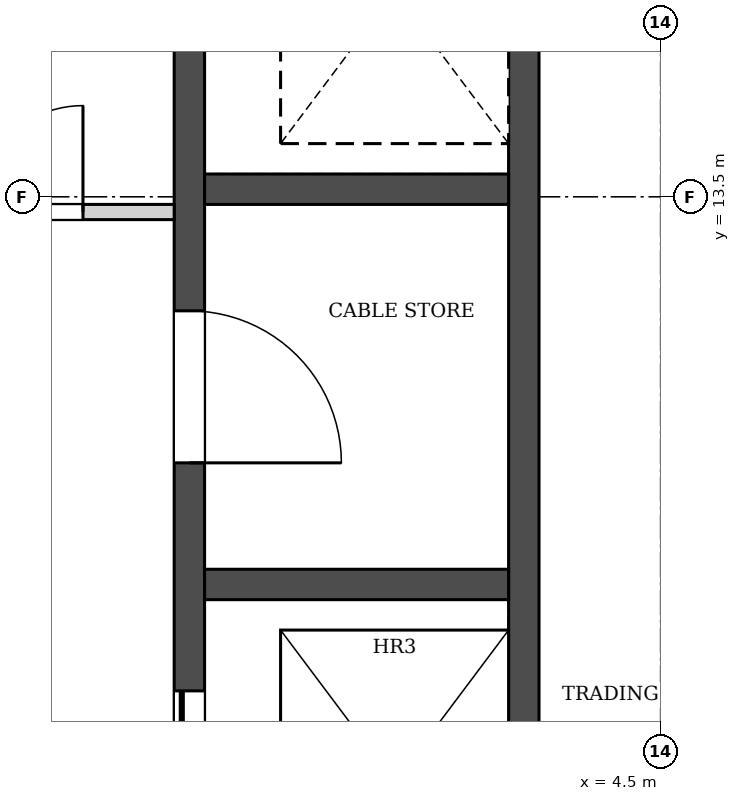
"""IFC4 building model, lengths in metres.
Left out: names, types, materials, properties, quantities, classifications, styles, units other than length and angle.
Written with IfcOpenShell. Run it as: python <this file> out.ifc"""

import sys

from ifc_helpers import new_model, si_unit, direction, frame, frame_2d, origin, place, context, subcontext, project, spatial, rectangle, extrude, element, fill, save


model = new_model("IFC4")
c1 = context("Model", 3, precision=1e-05, world=origin(), true_north=direction((0.0, 1.0)))
c2 = subcontext(c1, "Body", "Model", "MODEL_VIEW")
j1 = project(units=[si_unit("LENGTHUNIT", "METRE"), si_unit("PLANEANGLEUNIT", "RADIAN")], contexts=[c1])
p1 = place(None, origin())
s1 = spatial("IfcSite", under=j1, at=p1, CompositionType="ELEMENT")
p2 = place(p1, origin())
s2 = spatial("IfcBuilding", under=s1, at=p2, CompositionType="ELEMENT")
p3 = place(p2, frame((0.0, 0.0, 335.1)))
s3 = spatial("IfcBuildingStorey", under=s2, at=p3, CompositionType="ELEMENT", Elevation=335.1)
p4 = place(p3, frame((23.788, 7.709, 0.0), z_axis=(0.0, 0.0, 1.0), x_axis=(-0.500001731347, 0.866024404189, 0.0)))
e1 = element("IfcWall", 1, at=p4, inside=s3, PredefinedType="SOLIDWALL", context=c2, shape_type="SweptSolid", body=[
    extrude(rectangle(XDim=38.87, YDim=0.34, at=frame_2d((19.435, 0.0))), origin(), (0.0, 0.0, 1.0), 3.8),
])
p5 = place(p4, frame((3.218, 0.0, 0.9)))
e2 = element("IfcOpeningElement", 2, at=p5, cuts=e1, PredefinedType="OPENING", context=c2, shape_type="SweptSolid", body=[
    extrude(rectangle(XDim=1.885, YDim=2.6, at=frame_2d((0.942, 1.3))), frame((0.0, 0.18, 0.0), z_axis=(0.0, -1.0, 0.0), x_axis=(1.0, 0.0, 0.0)), (0.0, 0.0, 1.0), 0.36),
])
p6 = place(p4, frame((6.218, 0.0, 0.9)))
e3 = element("IfcOpeningElement", 3, at=p6, cuts=e1, PredefinedType="OPENING", context=c2, shape_type="SweptSolid", body=[
    extrude(rectangle(XDim=1.885, YDim=2.6, at=frame_2d((0.942, 1.3))), frame((0.0, 0.18, 0.0), z_axis=(0.0, -1.0, 0.0), x_axis=(1.0, 0.0, 0.0)), (0.0, 0.0, 1.0), 0.36),
])
p7 = place(p4, frame((9.218, 0.0, 0.9)))
e4 = element("IfcOpeningElement", 4, at=p7, cuts=e1, PredefinedType="OPENING", context=c2, shape_type="SweptSolid", body=[
    extrude(rectangle(XDim=1.885, YDim=2.6, at=frame_2d((0.942, 1.3))), frame((0.0, 0.18, 0.0), z_axis=(0.0, -1.0, 0.0), x_axis=(1.0, 0.0, 0.0)), (0.0, 0.0, 1.0), 0.36),
])
p8 = place(p4, frame((12.218, 0.0, 0.9)))
e5 = element("IfcOpeningElement", 5, at=p8, cuts=e1, PredefinedType="OPENING", context=c2, shape_type="SweptSolid", body=[
    extrude(rectangle(XDim=1.885, YDim=2.6, at=frame_2d((0.942, 1.3))), frame((0.0, 0.18, 0.0), z_axis=(0.0, -1.0, 0.0), x_axis=(1.0, 0.0, 0.0)), (0.0, 0.0, 1.0), 0.36),
])
p9 = place(p4, frame((15.218, 0.0, 0.9)))
e6 = element("IfcOpeningElement", 6, at=p9, cuts=e1, PredefinedType="OPENING", context=c2, shape_type="SweptSolid", body=[
    extrude(rectangle(XDim=1.885, YDim=2.6, at=frame_2d((0.942, 1.3))), frame((0.0, 0.18, 0.0), z_axis=(0.0, -1.0, 0.0), x_axis=(1.0, 0.0, 0.0)), (0.0, 0.0, 1.0), 0.36),
])
p10 = place(p4, frame((18.218, 0.0, 0.9)))
e7 = element("IfcOpeningElement", 7, at=p10, cuts=e1, PredefinedType="OPENING", context=c2, shape_type="SweptSolid", body=[
    extrude(rectangle(XDim=1.885, YDim=2.6, at=frame_2d((0.942, 1.3))), frame((0.0, 0.18, 0.0), z_axis=(0.0, -1.0, 0.0), x_axis=(1.0, 0.0, 0.0)), (0.0, 0.0, 1.0), 0.36),
])
p11 = place(p4, frame((21.218, 0.0, 0.9)))
e8 = element("IfcOpeningElement", 8, at=p11, cuts=e1, PredefinedType="OPENING", context=c2, shape_type="SweptSolid", body=[
    extrude(rectangle(XDim=1.885, YDim=2.6, at=frame_2d((0.942, 1.3))), frame((0.0, 0.18, 0.0), z_axis=(0.0, -1.0, 0.0), x_axis=(1.0, 0.0, 0.0)), (0.0, 0.0, 1.0), 0.36),
])
p12 = place(p4, frame((24.218, 0.0, 0.9)))
e9 = element("IfcOpeningElement", 9, at=p12, cuts=e1, PredefinedType="OPENING", context=c2, shape_type="SweptSolid", body=[
    extrude(rectangle(XDim=1.885, YDim=2.6, at=frame_2d((0.942, 1.3))), frame((0.0, 0.18, 0.0), z_axis=(0.0, -1.0, 0.0), x_axis=(1.0, 0.0, 0.0)), (0.0, 0.0, 1.0), 0.36),
])
p13 = place(p4, frame((27.218, 0.0, 0.9)))
e10 = element("IfcOpeningElement", 10, at=p13, cuts=e1, PredefinedType="OPENING", context=c2, shape_type="SweptSolid", body=[
    extrude(rectangle(XDim=1.885, YDim=2.6, at=frame_2d((0.942, 1.3))), frame((0.0, 0.18, 0.0), z_axis=(0.0, -1.0, 0.0), x_axis=(1.0, 0.0, 0.0)), (0.0, 0.0, 1.0), 0.36),
])
p14 = place(p4, frame((30.218, 0.0, 0.9)))
e11 = element("IfcOpeningElement", 11, at=p14, cuts=e1, PredefinedType="OPENING", context=c2, shape_type="SweptSolid", body=[
    extrude(rectangle(XDim=1.885, YDim=2.6, at=frame_2d((0.942, 1.3))), frame((0.0, 0.18, 0.0), z_axis=(0.0, -1.0, 0.0), x_axis=(1.0, 0.0, 0.0)), (0.0, 0.0, 1.0), 0.36),
])
p15 = place(p4, frame((33.218, 0.0, 0.9)))
e12 = element("IfcOpeningElement", 12, at=p15, cuts=e1, PredefinedType="OPENING", context=c2, shape_type="SweptSolid", body=[
    extrude(rectangle(XDim=1.885, YDim=2.6, at=frame_2d((0.942, 1.3))), frame((0.0, 0.18, 0.0), z_axis=(0.0, -1.0, 0.0), x_axis=(1.0, 0.0, 0.0)), (0.0, 0.0, 1.0), 0.36),
])
p16 = place(p4, frame((1.051, 0.0, 0.9)))
e13 = element("IfcOpeningElement", 13, at=p16, cuts=e1, PredefinedType="OPENING", context=c2, shape_type="SweptSolid", body=[
    extrude(rectangle(XDim=1.115, YDim=2.4, at=frame_2d((0.558, 1.2))), frame((0.0, 0.18, 0.0), z_axis=(0.0, -1.0, 0.0), x_axis=(1.0, 0.0, 0.0)), (0.0, 0.0, 1.0), 0.36),
])
p17 = place(p4, frame((36.429, 0.0, 0.9)))
e14 = element("IfcOpeningElement", 14, at=p17, cuts=e1, PredefinedType="OPENING", context=c2, shape_type="SweptSolid", body=[
    extrude(rectangle(XDim=1.115, YDim=2.4, at=frame_2d((0.558, 1.2))), frame((0.0, 0.18, 0.0), z_axis=(0.0, -1.0, 0.0), x_axis=(1.0, 0.0, 0.0)), (0.0, 0.0, 1.0), 0.36),
])
p18 = place(p3, frame((3.6, 8.45, -0.4), z_axis=(0.0, 0.0, 1.0), x_axis=(0.0, 1.0, 0.0)))
e15 = element("IfcWall", 15, at=p18, inside=s3, PredefinedType="SOLIDWALL", context=c2, shape_type="SweptSolid", body=[
    extrude(rectangle(XDim=7.8, YDim=0.2, at=frame_2d((3.9, 0.0))), origin(), (0.0, 0.0, 1.0), 4.2),
])
p19 = place(p3, frame((1.4, 5.85, -0.4), z_axis=(0.0, 0.0, 1.0), x_axis=(0.0, 1.0, 0.0)))
e16 = element("IfcWall", 16, at=p19, inside=s3, PredefinedType="SOLIDWALL", context=c2, shape_type="SweptSolid", body=[
    extrude(rectangle(XDim=11.75, YDim=0.2, at=frame_2d((5.875, 0.0))), origin(), (0.0, 0.0, 1.0), 4.2),
])
p20 = place(p19, frame((3.2, 0.0, 0.4)))
e17 = element("IfcOpeningElement", 17, at=p20, cuts=e16, PredefinedType="OPENING", context=c2, shape_type="SweptSolid", body=[
    extrude(rectangle(XDim=1.2, YDim=2.1, at=frame_2d((0.6, 1.05))), frame((0.0, 0.11, 0.0), z_axis=(0.0, -1.0, 0.0), x_axis=(1.0, 0.0, 0.0)), (0.0, 0.0, 1.0), 0.22),
])
p21 = place(p19, frame((0.65, 0.0, 0.4)))
e18 = element("IfcOpeningElement", 18, at=p21, cuts=e16, PredefinedType="OPENING", context=c2, shape_type="SweptSolid", body=[
    extrude(rectangle(XDim=1.1, YDim=2.1, at=frame_2d((0.55, 1.05))), frame((0.0, 0.11, 0.0), z_axis=(0.0, -1.0, 0.0), x_axis=(1.0, 0.0, 0.0)), (0.0, 0.0, 1.0), 0.22),
])
p22 = place(p19, frame((5.9, 0.0, 0.4)))
e19 = element("IfcOpeningElement", 19, at=p22, cuts=e16, PredefinedType="OPENING", context=c2, shape_type="SweptSolid", body=[
    extrude(rectangle(XDim=1.0, YDim=2.1, at=frame_2d((0.5, 1.05))), frame((0.0, 0.11, 0.0), z_axis=(0.0, -1.0, 0.0), x_axis=(1.0, 0.0, 0.0)), (0.0, 0.0, 1.0), 0.22),
])
for number, where, z_axis, x_axis in (
    (20, (1.5, 10.95, -0.4), (0.0, 0.0, 1.0), (1.0, 0.0, 0.0)),
    (21, (1.5, 13.55, -0.4), (0.0, 0.0, 1.0), (1.0, 0.0, 0.0)),
):
    element("IfcWall", number, at=place(p3, frame(where, z_axis=z_axis, x_axis=x_axis)), inside=s3, PredefinedType="SOLIDWALL", context=c2, shape_type="SweptSolid", body=[
        extrude(rectangle(XDim=2.0, YDim=0.2, at=frame_2d((1.0, 0.0))), origin(), (0.0, 0.0, 1.0), 4.2),
    ])
p23 = place(p3, frame((-1.3, 13.4, 0.0), z_axis=(0.0, 0.0, 1.0), x_axis=(1.0, 0.0, 0.0)))
e22 = element("IfcWall", 22, at=p23, inside=s3, PredefinedType="PARTITIONING", context=c2, shape_type="SweptSolid", body=[
    extrude(rectangle(XDim=2.6, YDim=0.1, at=frame_2d((1.3, 0.0))), origin(), (0.0, 0.0, 1.0), 3.8),
])
p24 = place(p23, frame((0.6, 0.0, 0.0)))
e23 = element("IfcOpeningElement", 23, at=p24, cuts=e22, PredefinedType="OPENING", context=c2, shape_type="SweptSolid", body=[
    extrude(rectangle(XDim=1.4, YDim=2.1, at=frame_2d((0.7, 1.05))), frame((0.0, 0.06, 0.0), z_axis=(0.0, -1.0, 0.0), x_axis=(1.0, 0.0, 0.0)), (0.0, 0.0, 1.0), 0.12),
])
p25 = place(p20, origin())
e24 = element("IfcDoor", 24, at=p25, inside=s3, OperationType="SLIDING_TO_LEFT", PredefinedType="DOOR", context=c2, shape_type="SweptSolid", body=[
    extrude(rectangle(XDim=1.2, YDim=2.1, at=frame_2d((0.6, 1.05))), frame((0.0, 0.025, 0.0), z_axis=(0.0, -1.0, 0.0), x_axis=(1.0, 0.0, 0.0)), (0.0, 0.0, 1.0), 0.05),
])
fill(e17, e24)
p26 = place(p22, frame((1.0, 0.0, 0.0), z_axis=(0.0, 0.0, 1.0), x_axis=(-1.0, 0.0, 0.0)))
e25 = element("IfcDoor", 25, at=p26, inside=s3, OperationType="SINGLE_SWING_RIGHT", PredefinedType="DOOR", context=c2, shape_type="SweptSolid", body=[
    extrude(rectangle(XDim=1.0, YDim=2.1, at=frame_2d((0.5, 1.05))), frame((0.0, 0.025, 0.0), z_axis=(0.0, -1.0, 0.0), x_axis=(1.0, 0.0, 0.0)), (0.0, 0.0, 1.0), 0.05),
])
fill(e19, e25)
p27 = place(p24, origin())
e26 = element("IfcDoor", 26, at=p27, inside=s3, OperationType="DOUBLE_DOOR_SINGLE_SWING", PredefinedType="DOOR", context=c2, shape_type="SweptSolid", body=[
    extrude(rectangle(XDim=1.4, YDim=2.1, at=frame_2d((0.7, 1.05))), frame((0.0, 0.025, 0.0), z_axis=(0.0, -1.0, 0.0), x_axis=(1.0, 0.0, 0.0)), (0.0, 0.0, 1.0), 0.05),
])
fill(e23, e26)
save(model, sys.argv[1])
